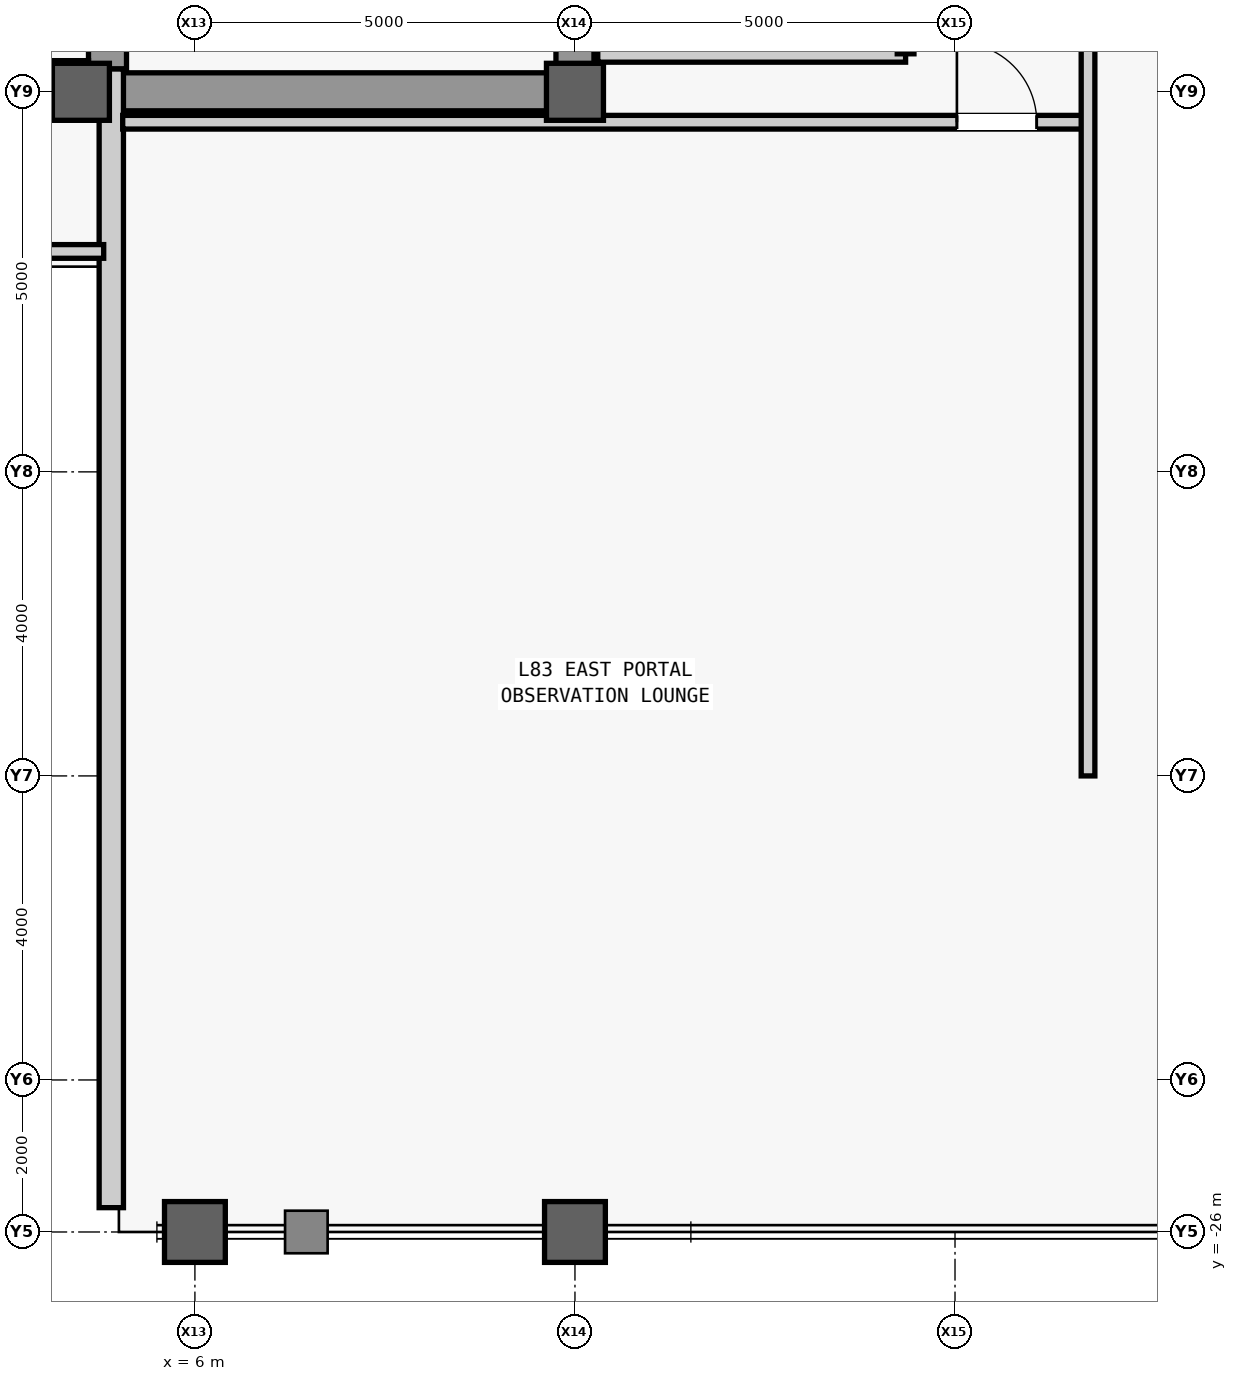
"""IFC4 building model, lengths in metres.
Left out: names, types, materials, properties, quantities, classifications, styles, units other than length and angle.
Written with IfcOpenShell. Run it as: python <this file> out.ifc"""

import sys

from ifc_helpers import new_model, si_unit, direction, frame, frame_2d, origin, origin_2d, place, context, subcontext, project, spatial, rectangle, hollow_rectangle, extrude, source, transform, mapped, element, fill, save


model = new_model("IFC4")
c1 = context("Model", 3, precision=1e-05, world=origin(), true_north=direction((0.0, 1.0)))
c2 = subcontext(c1, "Body", "Model", "MODEL_VIEW")
j1 = project(units=[si_unit("LENGTHUNIT", "METRE"), si_unit("PLANEANGLEUNIT", "RADIAN")], contexts=[c1])
p1 = place(None, origin())
s1 = spatial("IfcSite", under=j1, at=p1, CompositionType="ELEMENT")
p2 = place(p1, origin())
s2 = spatial("IfcBuilding", under=s1, at=p2, CompositionType="ELEMENT")
p3 = place(p2, frame((0.0, 0.0, 350.3)))
s3 = spatial("IfcBuildingStorey", under=s2, at=p3, CompositionType="ELEMENT", Elevation=350.3)
m1 = source(origin(), c2, "Body", "SweptSolid", [
    extrude(rectangle(XDim=22.0, YDim=0.5, at=frame_2d((11.0, 0.0))), origin(), (0.0, 0.0, 1.0), 3.74),
])
p4 = place(p3, frame((11.0, -11.0, 0.0), z_axis=(0.0, 0.0, 1.0), x_axis=(0.0, 1.0, 0.0)))
e1 = element("IfcWall", 1, at=p4, inside=s3, PredefinedType="SHEAR", context=c2, shape_type="MappedRepresentation", body=[
    mapped(m1, transform((0.0, 0.0, 0.0), scale=1.0)),
])
m2 = source(origin(), c2, "Body", "SweptSolid", [
    extrude(rectangle(XDim=1.1, YDim=2.2, at=frame_2d((0.55, 1.1))), frame((0.0, 0.26, 0.0), z_axis=(0.0, -1.0, 0.0), x_axis=(1.0, 0.0, 0.0)), (0.0, 0.0, 1.0), 0.52),
])
p5 = place(p4, frame((0.8, 0.0, 0.0)))
e2 = element("IfcOpeningElement", 2, at=p5, cuts=e1, PredefinedType="OPENING", context=c2, shape_type="MappedRepresentation", body=[
    mapped(m2, transform((0.0, 0.0, 0.0), scale=1.0)),
])
m3 = source(origin(), c2, "Body", "SweptSolid", [
    extrude(rectangle(XDim=0.9, YDim=2.15, at=frame_2d((0.45, 1.075))), frame((0.0, 0.26, 0.0), z_axis=(0.0, -1.0, 0.0), x_axis=(1.0, 0.0, 0.0)), (0.0, 0.0, 1.0), 0.52),
])
p6 = place(p4, frame((6.85, 0.0, 0.0)))
e3 = element("IfcOpeningElement", 3, at=p6, cuts=e1, PredefinedType="OPENING", context=c2, shape_type="MappedRepresentation", body=[
    mapped(m3, transform((0.0, 0.0, 0.0), scale=1.0)),
])
m4 = source(origin(), c2, "Body", "SweptSolid", [
    extrude(rectangle(XDim=1.2, YDim=2.3, at=frame_2d((0.6, 1.15))), frame((0.0, 0.26, 0.0), z_axis=(0.0, -1.0, 0.0), x_axis=(1.0, 0.0, 0.0)), (0.0, 0.0, 1.0), 0.52),
])
p7 = place(p4, frame((17.6, 0.0, 0.0)))
e4 = element("IfcOpeningElement", 4, at=p7, cuts=e1, PredefinedType="OPENING", context=c2, shape_type="MappedRepresentation", body=[
    mapped(m4, transform((0.0, 0.0, 0.0), scale=1.0)),
])
p8 = place(p4, frame((19.6, 0.0, 0.0)))
e5 = element("IfcOpeningElement", 5, at=p8, cuts=e1, PredefinedType="OPENING", context=c2, shape_type="MappedRepresentation", body=[
    mapped(m4, transform((0.0, 0.0, 0.0), scale=1.0)),
])
m5 = source(origin(), c2, "Body", "SweptSolid", [
    extrude(rectangle(XDim=1.3, YDim=2.3, at=frame_2d((0.65, 1.15))), frame((0.0, 0.26, 0.0), z_axis=(0.0, -1.0, 0.0), x_axis=(1.0, 0.0, 0.0)), (0.0, 0.0, 1.0), 0.52),
])
p9 = place(p4, frame((2.7, 0.0, 0.0)))
e6 = element("IfcOpeningElement", 6, at=p9, cuts=e1, PredefinedType="OPENING", context=c2, shape_type="MappedRepresentation", body=[
    mapped(m5, transform((0.0, 0.0, 0.0), scale=1.0)),
])
p10 = place(p4, frame((13.35, 0.0, 0.0)))
e7 = element("IfcOpeningElement", 7, at=p10, cuts=e1, PredefinedType="OPENING", context=c2, shape_type="MappedRepresentation", body=[
    mapped(m5, transform((0.0, 0.0, 0.0), scale=1.0)),
])
m6 = source(origin(), c2, "Body", "SweptSolid", [
    extrude(rectangle(XDim=21.4, YDim=0.5, at=frame_2d((10.7, 0.0))), origin(), (0.0, 0.0, 1.0), 3.74),
])
p11 = place(p3, frame((4.85, -10.7, 0.0), z_axis=(0.0, 0.0, 1.0), x_axis=(0.0, 1.0, 0.0)))
e8 = element("IfcWall", 8, at=p11, inside=s3, PredefinedType="SHEAR", context=c2, shape_type="MappedRepresentation", body=[
    mapped(m6, transform((0.0, 0.0, 0.0), scale=1.0)),
])
m7 = source(origin(), c2, "Body", "SweptSolid", [
    extrude(rectangle(XDim=5.9, YDim=0.5, at=frame_2d((2.95, 0.0))), origin(), (0.0, 0.0, 1.0), 3.74),
])
p12 = place(p3, frame((4.85, -11.0, 0.0), z_axis=(0.0, 0.0, 1.0), x_axis=(1.0, 0.0, 0.0)))
e9 = element("IfcWall", 9, at=p12, inside=s3, PredefinedType="SHEAR", context=c2, shape_type="MappedRepresentation", body=[
    mapped(m7, transform((0.0, 0.0, 0.0), scale=1.0)),
])
m8 = source(origin(), c2, "Body", "SweptSolid", [
    extrude(rectangle(XDim=0.75, YDim=0.75, at=origin_2d()), origin(), (0.0, 0.0, 1.0), 4.0),
])
p13 = place(p3, frame((4.5, -11.0, 0.0), z_axis=(0.0, 0.0, 1.0), x_axis=(1.0, 0.0, 0.0)))
e10 = element("IfcColumn", 10, at=p13, inside=s3, PredefinedType="COLUMN", context=c2, shape_type="MappedRepresentation", body=[
    mapped(m8, transform((0.0, 0.0, 0.0), scale=1.0)),
])
m9 = source(origin(), c2, "Body", "SweptSolid", [
    extrude(hollow_rectangle(XDim=0.8, YDim=0.8, WallThickness=0.045, at=origin_2d()), origin(), (0.0, 0.0, 1.0), 4.0),
])
for number, where, z_axis, x_axis in (
    (11, (6.0, -26.0, 0.0), (0.0, 0.0, 1.0), (1.0, 0.0, 0.0)),
    (12, (11.0, -26.0, 0.0), (0.0, 0.0, 1.0), (1.0, 0.0, 0.0)),
):
    element("IfcColumn", number, at=place(p3, frame(where, z_axis=z_axis, x_axis=x_axis)), inside=s3, PredefinedType="COLUMN", context=c2, shape_type="MappedRepresentation", body=[
        mapped(m9, transform((0.0, 0.0, 0.0), scale=1.0)),
    ])
p14 = place(p3, frame((11.0, -11.0, 0.0), z_axis=(0.0, 0.0, 1.0), x_axis=(1.0, 0.0, 0.0)))
e13 = element("IfcColumn", 13, at=p14, inside=s3, PredefinedType="COLUMN", context=c2, shape_type="MappedRepresentation", body=[
    mapped(m8, transform((0.0, 0.0, 0.0), scale=1.0)),
])
m10 = source(origin(), c2, "Body", "SweptSolid", [
    extrude(rectangle(XDim=14.98, YDim=0.32, at=frame_2d((7.49, 0.0))), origin(), (0.0, 0.0, 1.0), 3.045),
])
p15 = place(p3, frame((4.9, -25.68, 0.0), z_axis=(0.0, 0.0, 1.0), x_axis=(0.0, 1.0, 0.0)))
e14 = element("IfcWall", 14, at=p15, inside=s3, PredefinedType="STANDARD", context=c2, shape_type="MappedRepresentation", body=[
    mapped(m10, transform((0.0, 0.0, 0.0), scale=1.0)),
])
m11 = source(origin(), c2, "Body", "SweptSolid", [
    extrude(rectangle(XDim=4.05, YDim=0.22, at=frame_2d((2.025, 0.0))), origin(), (0.0, 0.0, 1.0), 3.74),
])
p16 = place(p3, frame((11.3, -10.5, 0.0), z_axis=(0.0, 0.0, 1.0), x_axis=(1.0, 0.0, 0.0)))
e15 = element("IfcWall", 15, at=p16, inside=s3, PredefinedType="PARTITIONING", context=c2, shape_type="MappedRepresentation", body=[
    mapped(m11, transform((0.0, 0.0, 0.0), scale=1.0)),
])
m12 = source(origin(), c2, "Body", "SweptSolid", [
    extrude(rectangle(XDim=4.4, YDim=0.22, at=frame_2d((2.2, 0.0))), origin(), (0.0, 0.0, 1.0), 3.74),
])
p17 = place(p3, frame((15.35, -10.5, 0.0), z_axis=(0.0, 0.0, 1.0), x_axis=(0.0, 1.0, 0.0)))
e16 = element("IfcWall", 16, at=p17, inside=s3, PredefinedType="PARTITIONING", context=c2, shape_type="MappedRepresentation", body=[
    mapped(m12, transform((0.0, 0.0, 0.0), scale=1.0)),
])
m13 = source(origin(), c2, "Body", "SweptSolid", [
    extrude(rectangle(XDim=1.2, YDim=2.2, at=frame_2d((0.6, 1.1))), frame((0.0, 0.12, 0.0), z_axis=(0.0, -1.0, 0.0), x_axis=(1.0, 0.0, 0.0)), (0.0, 0.0, 1.0), 0.24),
])
p18 = place(p17, frame((1.6, 0.0, 0.0)))
e17 = element("IfcOpeningElement", 17, at=p18, cuts=e16, PredefinedType="OPENING", context=c2, shape_type="MappedRepresentation", body=[
    mapped(m13, transform((0.0, 0.0, 0.0), scale=1.0)),
])
m14 = source(origin(), c2, "Body", "SweptSolid", [
    extrude(rectangle(XDim=9.2, YDim=0.22, at=frame_2d((4.6, 0.0))), origin(), (0.0, 0.0, 1.0), 3.74),
])
p19 = place(p3, frame((-4.6, -10.7, 0.0), z_axis=(0.0, 0.0, 1.0), x_axis=(1.0, 0.0, 0.0)))
e18 = element("IfcWall", 18, at=p19, inside=s3, PredefinedType="PARTITIONING", context=c2, shape_type="MappedRepresentation", body=[
    mapped(m14, transform((0.0, 0.0, 0.0), scale=1.0)),
])
m15 = source(origin(), c2, "Body", "SweptSolid", [
    extrude(rectangle(XDim=0.95, YDim=2.15, at=frame_2d((0.475, 1.075))), frame((0.0, 0.12, 0.0), z_axis=(0.0, -1.0, 0.0), x_axis=(1.0, 0.0, 0.0)), (0.0, 0.0, 1.0), 0.24),
])
p20 = place(p19, frame((2.275, 0.0, 0.0)))
e19 = element("IfcOpeningElement", 19, at=p20, cuts=e18, PredefinedType="OPENING", context=c2, shape_type="MappedRepresentation", body=[
    mapped(m15, transform((0.0, 0.0, 0.0), scale=1.0)),
])
p21 = place(p19, frame((6.875, 0.0, 0.0)))
e20 = element("IfcOpeningElement", 20, at=p21, cuts=e18, PredefinedType="OPENING", context=c2, shape_type="MappedRepresentation", body=[
    mapped(m15, transform((0.0, 0.0, 0.0), scale=1.0)),
])
m16 = source(origin(), c2, "Body", "SweptSolid", [
    extrude(rectangle(XDim=22.55, YDim=0.18, at=frame_2d((11.275, 0.0))), origin(), (0.0, 0.0, 1.0), 3.74),
])
p22 = place(p3, frame((-17.75, -13.1, 0.0), z_axis=(0.0, 0.0, 1.0), x_axis=(1.0, 0.0, 0.0)))
e21 = element("IfcWall", 21, at=p22, inside=s3, PredefinedType="PARTITIONING", context=c2, shape_type="MappedRepresentation", body=[
    mapped(m16, transform((0.0, 0.0, 0.0), scale=1.0)),
])
m17 = source(origin(), c2, "Body", "SweptSolid", [
    extrude(rectangle(XDim=1.05, YDim=2.2, at=frame_2d((0.525, 1.1))), frame((0.0, 0.1, 0.0), z_axis=(0.0, -1.0, 0.0), x_axis=(1.0, 0.0, 0.0)), (0.0, 0.0, 1.0), 0.2),
])
p23 = place(p22, frame((0.675, 0.0, 0.0)))
e22 = element("IfcOpeningElement", 22, at=p23, cuts=e21, PredefinedType="OPENING", context=c2, shape_type="MappedRepresentation", body=[
    mapped(m17, transform((0.0, 0.0, 0.0), scale=1.0)),
])
m18 = source(origin(), c2, "Body", "SweptSolid", [
    extrude(rectangle(XDim=12.7, YDim=0.18, at=frame_2d((6.35, 0.0))), origin(), (0.0, 0.0, 1.0), 2.79),
])
p24 = place(p3, frame((5.05, -11.4, 0.0), z_axis=(0.0, 0.0, 1.0), x_axis=(1.0, 0.0, 0.0)))
e23 = element("IfcWall", 23, at=p24, inside=s3, PredefinedType="PARTITIONING", context=c2, shape_type="MappedRepresentation", body=[
    mapped(m18, transform((0.0, 0.0, 0.0), scale=1.0)),
])
p25 = place(p24, frame((10.975, 0.0, 0.0)))
e24 = element("IfcOpeningElement", 24, at=p25, cuts=e23, PredefinedType="OPENING", context=c2, shape_type="MappedRepresentation", body=[
    mapped(m17, transform((0.0, 0.0, 0.0), scale=1.0)),
])
m19 = source(origin(), c2, "Body", "SweptSolid", [
    extrude(rectangle(XDim=40.0, YDim=0.18, at=frame_2d((20.0, 0.0))), origin(), (0.0, 0.0, 1.0), 3.74),
])
p26 = place(p3, frame((17.75, -20.0, 0.0), z_axis=(0.0, 0.0, 1.0), x_axis=(0.0, 1.0, 0.0)))
e25 = element("IfcWall", 25, at=p26, inside=s3, PredefinedType="PARTITIONING", context=c2, shape_type="MappedRepresentation", body=[
    mapped(m19, transform((0.0, 0.0, 0.0), scale=1.0)),
])
m20 = source(origin(), c2, "Body", "SweptSolid", [
    extrude(rectangle(XDim=0.95, YDim=2.15, at=frame_2d((0.475, 1.075))), frame((0.0, 0.1, 0.0), z_axis=(0.0, -1.0, 0.0), x_axis=(1.0, 0.0, 0.0)), (0.0, 0.0, 1.0), 0.2),
])
p27 = place(p26, frame((11.161, 0.0, 0.0)))
e26 = element("IfcOpeningElement", 26, at=p27, cuts=e25, PredefinedType="OPENING", context=c2, shape_type="MappedRepresentation", body=[
    mapped(m20, transform((0.0, 0.0, 0.0), scale=1.0)),
])
p28 = place(p26, frame((16.789, 0.0, 0.0)))
e27 = element("IfcOpeningElement", 27, at=p28, cuts=e25, PredefinedType="OPENING", context=c2, shape_type="MappedRepresentation", body=[
    mapped(m20, transform((0.0, 0.0, 0.0), scale=1.0)),
])
p29 = place(p26, frame((22.945, 0.0, 0.0)))
e28 = element("IfcOpeningElement", 28, at=p29, cuts=e25, PredefinedType="OPENING", context=c2, shape_type="MappedRepresentation", body=[
    mapped(m20, transform((0.0, 0.0, 0.0), scale=1.0)),
])
p30 = place(p26, frame((28.967, 0.0, 0.0)))
e29 = element("IfcOpeningElement", 29, at=p30, cuts=e25, PredefinedType="OPENING", context=c2, shape_type="MappedRepresentation", body=[
    mapped(m20, transform((0.0, 0.0, 0.0), scale=1.0)),
])
m21 = source(origin(), c2, "Body", "SweptSolid", [
    extrude(rectangle(XDim=1.05, YDim=2.2, at=frame_2d((0.525, 1.1))), frame((0.0, 0.025, 0.0), z_axis=(0.0, -1.0, 0.0), x_axis=(1.0, 0.0, 0.0)), (0.0, 0.0, 1.0), 0.05),
])
p31 = place(p25, origin())
e30 = element("IfcDoor", 30, at=p31, inside=s3, OperationType="SINGLE_SWING_LEFT", PredefinedType="DOOR", context=c2, shape_type="MappedRepresentation", body=[
    mapped(m21, transform((0.0, 0.0, 0.0), scale=1.0)),
])
fill(e24, e30)
save(model, sys.argv[1])
